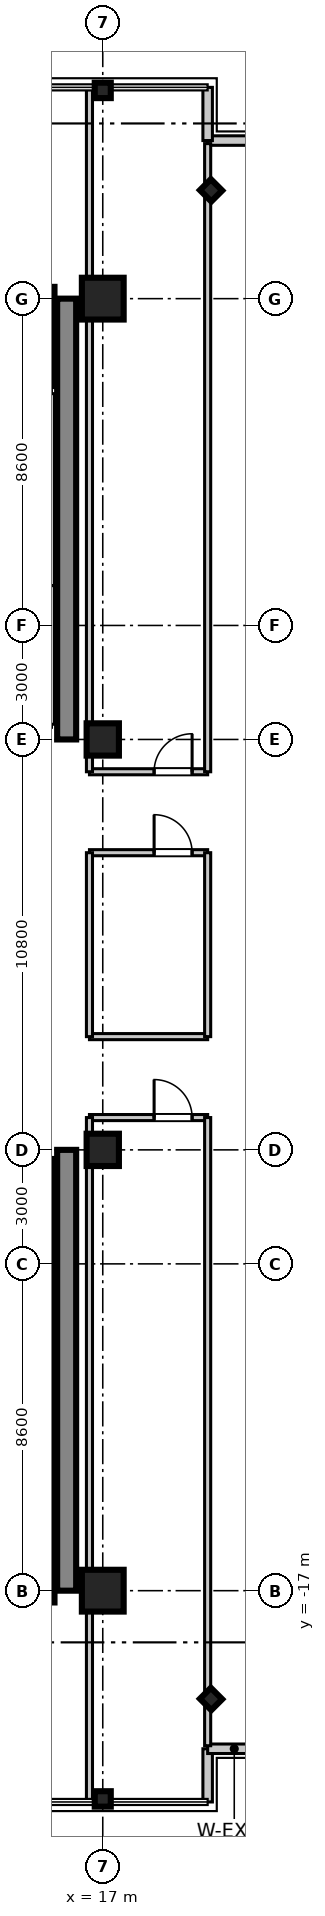
"""IFC4 building model, lengths in metres.
Left out: names, types, materials, properties, quantities, classifications, styles, units other than length and angle.
Written with IfcOpenShell. Run it as: python <this file> out.ifc"""

import sys

from ifc_helpers import new_model, si_unit, direction, frame, frame_2d, origin, origin_2d, place, context, subcontext, project, spatial, rectangle, i_section, extrude, source, transform, mapped, element, fill, save


model = new_model("IFC4")
c1 = context("Model", 3, precision=1e-05, world=origin(), true_north=direction((0.0, 1.0)))
c2 = subcontext(c1, "Body", "Model", "MODEL_VIEW")
j1 = project(units=[si_unit("LENGTHUNIT", "METRE"), si_unit("PLANEANGLEUNIT", "RADIAN")], contexts=[c1])
p1 = place(None, origin())
s1 = spatial("IfcSite", under=j1, at=p1, CompositionType="ELEMENT")
p2 = place(p1, origin())
s2 = spatial("IfcBuilding", under=s1, at=p2, CompositionType="ELEMENT")
p3 = place(p2, frame((0.0, 0.0, 156.3)))
s3 = spatial("IfcBuildingStorey", under=s2, at=p3, CompositionType="ELEMENT", Elevation=156.3)
m1 = source(origin(), c2, "Body", "SweptSolid", [
    extrude(rectangle(XDim=1.1, YDim=1.1, at=origin_2d()), origin(), (0.0, 0.0, 1.0), 3.605),
])
p4 = place(p3, frame((17.0, -17.0, 0.0), z_axis=(0.0, 0.0, 1.0), x_axis=(1.0, 0.0, 0.0)))
e1 = element("IfcColumn", 1, at=p4, inside=s3, PredefinedType="COLUMN", context=c2, shape_type="MappedRepresentation", body=[
    mapped(m1, transform((0.0, 0.0, 0.0), scale=1.0)),
])
m2 = source(origin(), c2, "Body", "SweptSolid", [
    extrude(rectangle(XDim=0.85, YDim=0.85, at=origin_2d()), origin(), (0.0, 0.0, 1.0), 3.605),
])
for number, where, z_axis, x_axis in (
    (2, (17.0, -5.4, 0.0), (0.0, 0.0, 1.0), (1.0, 0.0, 0.0)),
    (3, (17.0, 5.4, 0.0), (0.0, 0.0, 1.0), (1.0, 0.0, 0.0)),
):
    element("IfcColumn", number, at=place(p3, frame(where, z_axis=z_axis, x_axis=x_axis)), inside=s3, PredefinedType="PILASTER", context=c2, shape_type="MappedRepresentation", body=[
        mapped(m2, transform((0.0, 0.0, 0.0), scale=1.0)),
    ])
p5 = place(p3, frame((17.0, 17.0, 0.0), z_axis=(0.0, 0.0, 1.0), x_axis=(1.0, 0.0, 0.0)))
e4 = element("IfcColumn", 4, at=p5, inside=s3, PredefinedType="COLUMN", context=c2, shape_type="MappedRepresentation", body=[
    mapped(m1, transform((0.0, 0.0, 0.0), scale=1.0)),
])
m3 = source(origin(), c2, "Body", "SweptSolid", [
    extrude(i_section(OverallWidth=0.406, OverallDepth=0.422, WebThickness=0.019, FlangeThickness=0.03, at=origin_2d()), origin(), (0.0, 0.0, 1.0), 3.605),
])
for number, where, z_axis, x_axis in (
    (5, (17.0, -22.48, 0.0), (0.0, 0.0, 1.0), (0.0, 1.0, 0.0)),
    (6, (17.0, 22.48, 0.0), (0.0, 0.0, 1.0), (0.0, 1.0, 0.0)),
    (7, (19.85, -19.85, 0.0), (0.0, 0.0, 1.0), (0.707, 0.707, 0.0)),
    (8, (19.85, 19.85, 0.0), (0.0, 0.0, 1.0), (0.707, 0.707, 0.0)),
):
    element("IfcColumn", number, at=place(p3, frame(where, z_axis=z_axis, x_axis=x_axis)), inside=s3, PredefinedType="COLUMN", context=c2, shape_type="MappedRepresentation", body=[
        mapped(m3, transform((0.0, 0.0, 0.0), scale=1.0)),
    ])
m4 = source(origin(), c2, "Body", "SweptSolid", [
    extrude(rectangle(XDim=11.6, YDim=0.5, at=frame_2d((5.8, 0.0))), origin(), (0.0, 0.0, 1.0), 3.39),
])
for number, where, z_axis, x_axis in (
    (9, (16.05, 5.4, 0.0), (0.0, 0.0, 1.0), (0.0, 1.0, 0.0)),
    (10, (16.05, -17.0, 0.0), (0.0, 0.0, 1.0), (0.0, 1.0, 0.0)),
):
    element("IfcWall", number, at=place(p3, frame(where, z_axis=z_axis, x_axis=x_axis)), inside=s3, PredefinedType="SHEAR", context=c2, shape_type="MappedRepresentation", body=[
        mapped(m4, transform((0.0, 0.0, 0.0), scale=1.0)),
    ])
m5 = source(origin(), c2, "Body", "SweptSolid", [
    extrude(rectangle(XDim=2.36, YDim=0.22, at=frame_2d((1.18, 0.0))), origin(), (0.0, 0.0, 1.0), 3.39),
])
p6 = place(p3, frame((15.62, -8.0, 0.0), z_axis=(0.0, 0.0, 1.0), x_axis=(0.0, 1.0, 0.0)))
e11 = element("IfcWall", 11, at=p6, inside=s3, PredefinedType="SHEAR", context=c2, shape_type="MappedRepresentation", body=[
    mapped(m5, transform((0.0, 0.0, 0.0), scale=1.0)),
])
m6 = source(origin(), c2, "Body", "SweptSolid", [
    extrude(rectangle(XDim=2.2, YDim=0.22, at=frame_2d((1.1, 0.0))), origin(), (0.0, 0.0, 1.0), 3.39),
])
for number, where, z_axis, x_axis in (
    (12, (15.62, -10.2, 0.0), (0.0, 0.0, 1.0), (0.0, 1.0, 0.0)),
    (13, (15.62, -12.4, 0.0), (0.0, 0.0, 1.0), (0.0, 1.0, 0.0)),
):
    element("IfcWall", number, at=place(p3, frame(where, z_axis=z_axis, x_axis=x_axis)), inside=s3, PredefinedType="SHEAR", context=c2, shape_type="MappedRepresentation", body=[
        mapped(m6, transform((0.0, 0.0, 0.0), scale=1.0)),
    ])
m7 = source(origin(), c2, "Body", "SweptSolid", [
    extrude(rectangle(XDim=2.3, YDim=0.22, at=frame_2d((1.15, 0.0))), origin(), (0.0, 0.0, 1.0), 3.39),
])
p7 = place(p3, frame((15.62, -14.7, 0.0), z_axis=(0.0, 0.0, 1.0), x_axis=(0.0, 1.0, 0.0)))
e14 = element("IfcWall", 14, at=p7, inside=s3, PredefinedType="SHEAR", context=c2, shape_type="MappedRepresentation", body=[
    mapped(m7, transform((0.0, 0.0, 0.0), scale=1.0)),
])
m8 = source(origin(), c2, "Body", "SweptSolid", [
    extrude(rectangle(XDim=2.61, YDim=0.22, at=frame_2d((1.305, 0.0))), origin(), (0.0, 0.0, 1.0), 3.39),
])
for number, where, z_axis, x_axis in (
    (15, (15.62, 14.7, 0.0), (0.0, 0.0, 1.0), (0.0, 1.0, 0.0)),
    (16, (15.62, -17.31, 0.0), (0.0, 0.0, 1.0), (0.0, 1.0, 0.0)),
):
    element("IfcWall", number, at=place(p3, frame(where, z_axis=z_axis, x_axis=x_axis)), inside=s3, PredefinedType="SHEAR", context=c2, shape_type="MappedRepresentation", body=[
        mapped(m8, transform((0.0, 0.0, 0.0), scale=1.0)),
    ])
m9 = source(origin(), c2, "Body", "SweptSolid", [
    extrude(rectangle(XDim=1.4, YDim=0.25, at=frame_2d((0.7, 0.0))), origin(), (0.0, 0.0, 1.0), 3.39),
])
p8 = place(p3, frame((19.76, -22.56, 0.0), z_axis=(0.0, 0.0, 1.0), x_axis=(0.0, 1.0, 0.0)))
e17 = element("IfcWall", 17, at=p8, inside=s3, PredefinedType="STANDARD", context=c2, shape_type="MappedRepresentation", body=[
    mapped(m9, transform((0.0, 0.0, 0.0), scale=1.0)),
])
m10 = source(origin(), c2, "Body", "SweptSolid", [
    extrude(rectangle(XDim=1.4, YDim=0.25, at=frame_2d((0.7, 0.0))), origin(), (0.0, 0.0, 1.0), 3.39),
])
for number, where, z_axis, x_axis in (
    (18, (19.76, -21.16, 0.0), (0.0, 0.0, 1.0), (1.0, 0.0, 0.0)),
    (19, (19.76, 21.16, 0.0), (0.0, 0.0, 1.0), (1.0, 0.0, 0.0)),
):
    element("IfcWall", number, at=place(p3, frame(where, z_axis=z_axis, x_axis=x_axis)), inside=s3, PredefinedType="STANDARD", context=c2, shape_type="MappedRepresentation", body=[
        mapped(m10, transform((0.0, 0.0, 0.0), scale=1.0)),
    ])
p9 = place(p3, frame((19.76, 21.16, 0.0), z_axis=(0.0, 0.0, 1.0), x_axis=(0.0, 1.0, 0.0)))
e20 = element("IfcWall", 20, at=p9, inside=s3, PredefinedType="STANDARD", context=c2, shape_type="MappedRepresentation", body=[
    mapped(m9, transform((0.0, 0.0, 0.0), scale=1.0)),
])
m11 = source(origin(), c2, "Body", "SweptSolid", [
    extrude(rectangle(XDim=3.65, YDim=0.16, at=frame_2d((1.825, 0.0))), origin(), (0.0, 0.0, 1.0), 2.73),
])
p10 = place(p3, frame((15.65, 5.8, 0.0), z_axis=(0.0, 0.0, 1.0), x_axis=(0.0, 1.0, 0.0)))
e21 = element("IfcWall", 21, at=p10, inside=s3, PredefinedType="PARTITIONING", context=c2, shape_type="MappedRepresentation", body=[
    mapped(m11, transform((0.0, 0.0, 0.0), scale=1.0)),
])
m12 = source(origin(), c2, "Body", "SweptSolid", [
    extrude(rectangle(XDim=5.05, YDim=0.16, at=frame_2d((2.525, 0.0))), origin(), (0.0, 0.0, 1.0), 2.73),
])
p11 = place(p3, frame((15.65, 9.45, 0.0), z_axis=(0.0, 0.0, 1.0), x_axis=(0.0, 1.0, 0.0)))
e22 = element("IfcWall", 22, at=p11, inside=s3, PredefinedType="PARTITIONING", context=c2, shape_type="MappedRepresentation", body=[
    mapped(m12, transform((0.0, 0.0, 0.0), scale=1.0)),
])
m13 = source(origin(), c2, "Body", "SweptSolid", [
    extrude(rectangle(XDim=3.11, YDim=0.16, at=frame_2d((1.555, 0.0))), origin(), (0.0, 0.0, 1.0), 2.73),
])
p12 = place(p3, frame((16.65, 4.55, 0.0), z_axis=(0.0, 0.0, 1.0), x_axis=(1.0, 0.0, 0.0)))
e23 = element("IfcWall", 23, at=p12, inside=s3, PredefinedType="PARTITIONING", context=c2, shape_type="MappedRepresentation", body=[
    mapped(m13, transform((0.0, 0.0, 0.0), scale=1.0)),
])
p13 = place(p12, frame((1.701, 0.0, 0.0)))
e24 = element("IfcOpeningElement", 24, at=p13, cuts=e23, PredefinedType="OPENING", context=c2, shape_type="SweptSolid", body=[
    extrude(rectangle(XDim=1.0, YDim=2.1, at=frame_2d((0.5, 1.05))), frame((0.0, 0.09, 0.0), z_axis=(0.0, -1.0, 0.0), x_axis=(1.0, 0.0, 0.0)), (0.0, 0.0, 1.0), 0.18),
])
m14 = source(origin(), c2, "Body", "SweptSolid", [
    extrude(rectangle(XDim=17.95, YDim=0.16, at=frame_2d((8.975, 0.0))), origin(), (0.0, 0.0, 1.0), 2.73),
])
p14 = place(p3, frame((16.65, 4.55, 0.0), z_axis=(0.0, 0.0, 1.0), x_axis=(0.0, 1.0, 0.0)))
e25 = element("IfcWall", 25, at=p14, inside=s3, PredefinedType="PARTITIONING", context=c2, shape_type="MappedRepresentation", body=[
    mapped(m14, transform((0.0, 0.0, 0.0), scale=1.0)),
])
m15 = source(origin(), c2, "Body", "SweptSolid", [
    extrude(rectangle(XDim=16.53, YDim=0.16, at=frame_2d((8.265, 0.0))), origin(), (0.0, 0.0, 1.0), 2.73),
])
p15 = place(p3, frame((19.76, 4.55, 0.0), z_axis=(0.0, 0.0, 1.0), x_axis=(0.0, 1.0, 0.0)))
e26 = element("IfcWall", 26, at=p15, inside=s3, PredefinedType="PARTITIONING", context=c2, shape_type="MappedRepresentation", body=[
    mapped(m15, transform((0.0, 0.0, 0.0), scale=1.0)),
])
p16 = place(p3, frame((16.65, -4.55, 0.0), z_axis=(0.0, 0.0, 1.0), x_axis=(1.0, 0.0, 0.0)))
e27 = element("IfcWall", 27, at=p16, inside=s3, PredefinedType="PARTITIONING", context=c2, shape_type="MappedRepresentation", body=[
    mapped(m13, transform((0.0, 0.0, 0.0), scale=1.0)),
])
p17 = place(p16, frame((1.701, 0.0, 0.0)))
e28 = element("IfcOpeningElement", 28, at=p17, cuts=e27, PredefinedType="OPENING", context=c2, shape_type="SweptSolid", body=[
    extrude(rectangle(XDim=1.0, YDim=2.1, at=frame_2d((0.5, 1.05))), frame((0.0, 0.09, 0.0), z_axis=(0.0, -1.0, 0.0), x_axis=(1.0, 0.0, 0.0)), (0.0, 0.0, 1.0), 0.18),
])
p18 = place(p3, frame((16.65, -22.5, 0.0), z_axis=(0.0, 0.0, 1.0), x_axis=(0.0, 1.0, 0.0)))
e29 = element("IfcWall", 29, at=p18, inside=s3, PredefinedType="PARTITIONING", context=c2, shape_type="MappedRepresentation", body=[
    mapped(m14, transform((0.0, 0.0, 0.0), scale=1.0)),
])
p19 = place(p3, frame((19.76, -21.08, 0.0), z_axis=(0.0, 0.0, 1.0), x_axis=(0.0, 1.0, 0.0)))
e30 = element("IfcWall", 30, at=p19, inside=s3, PredefinedType="PARTITIONING", context=c2, shape_type="MappedRepresentation", body=[
    mapped(m15, transform((0.0, 0.0, 0.0), scale=1.0)),
])
p20 = place(p3, frame((16.65, -2.42, 0.0), z_axis=(0.0, 0.0, 1.0), x_axis=(1.0, 0.0, 0.0)))
e31 = element("IfcWall", 31, at=p20, inside=s3, PredefinedType="PARTITIONING", context=c2, shape_type="MappedRepresentation", body=[
    mapped(m13, transform((0.0, 0.0, 0.0), scale=1.0)),
])
p21 = place(p3, frame((16.65, 2.42, 0.0), z_axis=(0.0, 0.0, 1.0), x_axis=(1.0, 0.0, 0.0)))
e32 = element("IfcWall", 32, at=p21, inside=s3, PredefinedType="PARTITIONING", context=c2, shape_type="MappedRepresentation", body=[
    mapped(m13, transform((0.0, 0.0, 0.0), scale=1.0)),
])
p22 = place(p21, frame((1.701, 0.0, 0.0)))
e33 = element("IfcOpeningElement", 33, at=p22, cuts=e32, PredefinedType="OPENING", context=c2, shape_type="SweptSolid", body=[
    extrude(rectangle(XDim=1.0, YDim=2.1, at=frame_2d((0.5, 1.05))), frame((0.0, 0.09, 0.0), z_axis=(0.0, -1.0, 0.0), x_axis=(1.0, 0.0, 0.0)), (0.0, 0.0, 1.0), 0.18),
])
m16 = source(origin(), c2, "Body", "SweptSolid", [
    extrude(rectangle(XDim=4.84, YDim=0.16, at=frame_2d((2.42, 0.0))), origin(), (0.0, 0.0, 1.0), 2.73),
])
for number, where, z_axis, x_axis in (
    (34, (16.65, -2.42, 0.0), (0.0, 0.0, 1.0), (0.0, 1.0, 0.0)),
    (35, (19.76, -2.42, 0.0), (0.0, 0.0, 1.0), (0.0, 1.0, 0.0)),
):
    element("IfcWall", number, at=place(p3, frame(where, z_axis=z_axis, x_axis=x_axis)), inside=s3, PredefinedType="PARTITIONING", context=c2, shape_type="MappedRepresentation", body=[
        mapped(m16, transform((0.0, 0.0, 0.0), scale=1.0)),
    ])
m17 = source(origin(), c2, "Body", "SweptSolid", [
    extrude(rectangle(XDim=1.0, YDim=2.1, at=frame_2d((0.5, 1.05))), frame((0.0, 0.025, 0.0), z_axis=(0.0, -1.0, 0.0), x_axis=(1.0, 0.0, 0.0)), (0.0, 0.0, 1.0), 0.05),
])
p23 = place(p13, origin())
e36 = element("IfcDoor", 36, at=p23, inside=s3, OperationType="SINGLE_SWING_RIGHT", PredefinedType="DOOR", context=c2, shape_type="MappedRepresentation", body=[
    mapped(m17, transform((0.0, 0.0, 0.0), scale=1.0)),
])
fill(e24, e36)
p24 = place(p17, frame((1.0, 0.0, 0.0), z_axis=(0.0, 0.0, 1.0), x_axis=(-1.0, 0.0, 0.0)))
e37 = element("IfcDoor", 37, at=p24, inside=s3, OperationType="SINGLE_SWING_LEFT", PredefinedType="DOOR", context=c2, shape_type="MappedRepresentation", body=[
    mapped(m17, transform((0.0, 0.0, 0.0), scale=1.0)),
])
fill(e28, e37)
p25 = place(p22, frame((1.0, 0.0, 0.0), z_axis=(0.0, 0.0, 1.0), x_axis=(-1.0, 0.0, 0.0)))
e38 = element("IfcDoor", 38, at=p25, inside=s3, OperationType="SINGLE_SWING_LEFT", PredefinedType="DOOR", context=c2, shape_type="MappedRepresentation", body=[
    mapped(m17, transform((0.0, 0.0, 0.0), scale=1.0)),
])
fill(e33, e38)
save(model, sys.argv[1])
